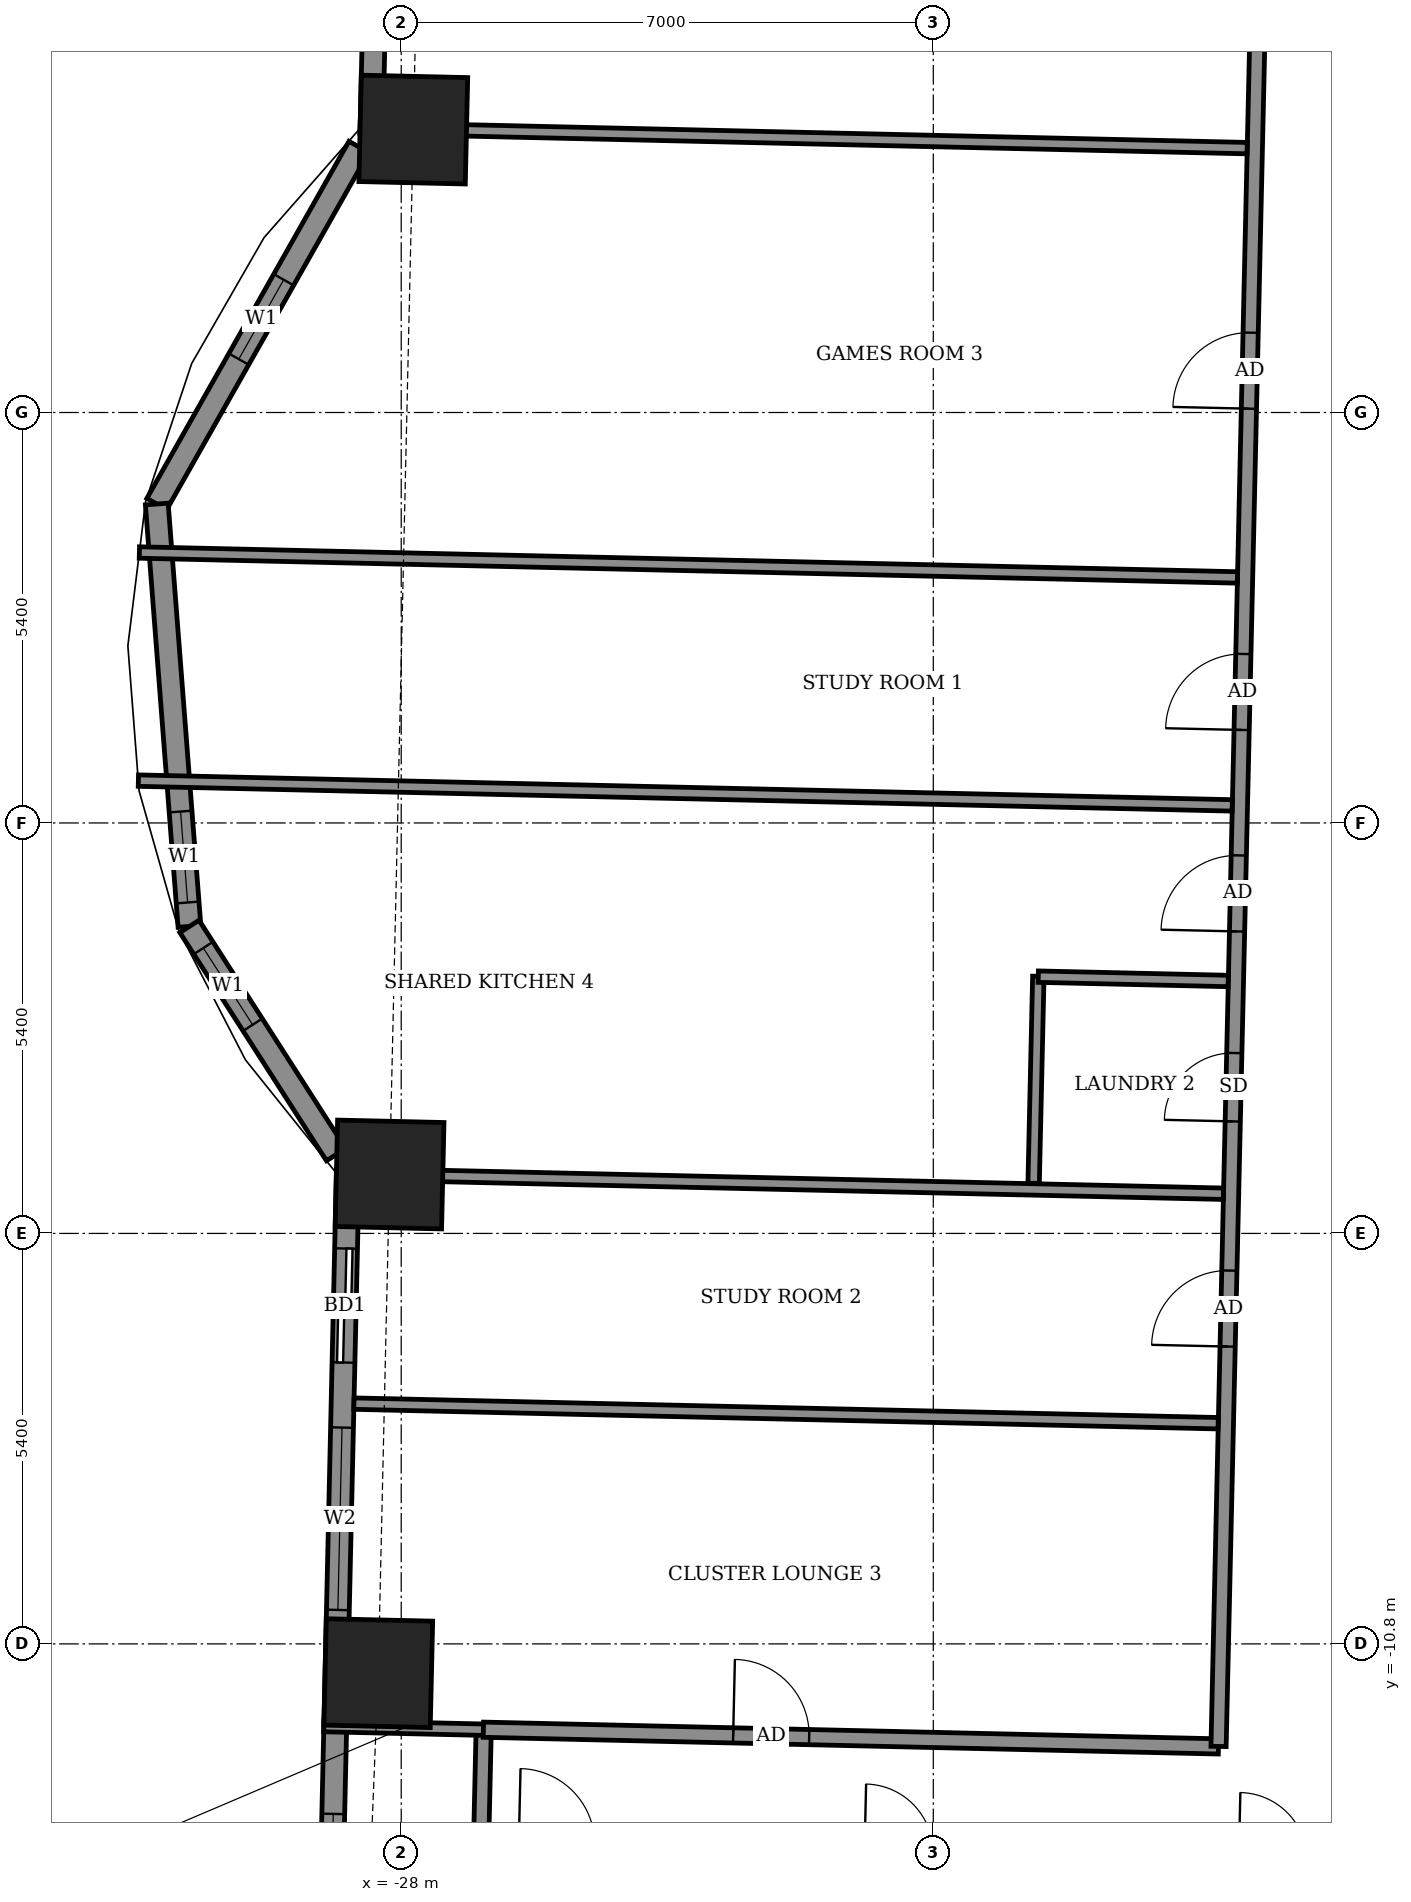
"""IFC4 building model, lengths in metres.
Left out: names, types, materials, properties, quantities, classifications, styles, units other than length and angle.
Written with IfcOpenShell. Run it as: python <this file> out.ifc"""

import sys

from ifc_helpers import new_model, si_unit, direction, frame, frame_2d, origin, origin_2d, place, context, subcontext, project, spatial, rectangle, extrude, element, fill, save


model = new_model("IFC4")
c1 = context("Model", 3, precision=1e-05, world=origin(), true_north=direction((0.0, 1.0)))
c2 = subcontext(c1, "Body", "Model", "MODEL_VIEW")
j1 = project(units=[si_unit("LENGTHUNIT", "METRE"), si_unit("PLANEANGLEUNIT", "RADIAN")], contexts=[c1])
p1 = place(None, origin())
s1 = spatial("IfcSite", under=j1, at=p1, CompositionType="ELEMENT")
p2 = place(p1, origin())
s2 = spatial("IfcBuilding", under=s1, at=p2, CompositionType="ELEMENT")
p3 = place(p2, frame((0.0, 0.0, 109.1)))
s3 = spatial("IfcBuildingStorey", under=s2, at=p3, CompositionType="ELEMENT", Elevation=109.1)
for number, where, z_axis, x_axis in (
    (1, (-28.153, -4.625, -0.55), (0.0, 0.0, 1.0), (-0.023, -1.0, 0.0)),
    (2, (-28.302, -11.185, -0.55), (0.0, 0.0, 1.0), (-0.023, -1.0, 0.0)),
    (3, (-27.841, 9.122, -0.55), (0.0, 0.0, 1.0), (-0.023, -1.0, 0.0)),
):
    element("IfcColumn", number, at=place(p3, frame(where, z_axis=z_axis, x_axis=x_axis)), inside=s3, PredefinedType="COLUMN", context=c2, shape_type="SweptSolid", body=[
        extrude(rectangle(XDim=1.4, YDim=1.4, at=origin_2d()), origin(), (0.0, 0.0, 1.0), 3.6),
    ])
p4 = place(p3, frame((-28.106, 21.707, 0.0), z_axis=(0.0, 0.0, 1.0), x_axis=(-0.022654663697, -0.999743350172, 0.0)))
e4 = element("IfcWall", 4, at=p4, inside=s3, PredefinedType="SOLIDWALL", context=c2, shape_type="SweptSolid", body=[
    extrude(rectangle(XDim=12.63, YDim=0.3, at=frame_2d((6.315, 0.0))), origin(), (0.0, 0.0, 1.0), 3.05),
])
p5 = place(p4, frame((2.625, 0.0, 0.0)))
e5 = element("IfcOpeningElement", 5, at=p5, cuts=e4, PredefinedType="OPENING", context=c2, shape_type="SweptSolid", body=[
    extrude(rectangle(XDim=1.5, YDim=2.4, at=frame_2d((0.75, 1.2))), frame((0.0, 0.16, 0.0), z_axis=(0.0, -1.0, 0.0), x_axis=(1.0, 0.0, 0.0)), (0.0, 0.0, 1.0), 0.32),
])
p6 = place(p4, frame((9.101, 0.0, 0.9)))
e6 = element("IfcOpeningElement", 6, at=p6, cuts=e4, PredefinedType="OPENING", context=c2, shape_type="SweptSolid", body=[
    extrude(rectangle(XDim=2.4, YDim=1.5, at=frame_2d((1.2, 0.75))), frame((0.0, 0.16, 0.0), z_axis=(0.0, -1.0, 0.0), x_axis=(1.0, 0.0, 0.0)), (0.0, 0.0, 1.0), 0.32),
])
p7 = place(p3, frame((-28.557, 8.894, 0.0), z_axis=(0.0, 0.0, 1.0), x_axis=(-0.492589172415, -0.8702619762, 0.0)))
e7 = element("IfcWall", 7, at=p7, inside=s3, PredefinedType="SOLIDWALL", context=c2, shape_type="SweptSolid", body=[
    extrude(rectangle(XDim=5.398, YDim=0.3, at=frame_2d((2.699, 0.0))), origin(), (0.0, 0.0, 1.0), 3.05),
])
p8 = place(p7, frame((2.008, 0.0, 0.9)))
e8 = element("IfcOpeningElement", 8, at=p8, cuts=e7, PredefinedType="OPENING", context=c2, shape_type="SweptSolid", body=[
    extrude(rectangle(XDim=1.2, YDim=1.5, at=frame_2d((0.6, 0.75))), frame((0.0, 0.16, 0.0), z_axis=(0.0, -1.0, 0.0), x_axis=(1.0, 0.0, 0.0)), (0.0, 0.0, 1.0), 0.32),
])
p9 = place(p3, frame((-31.216, 4.196, 0.0), z_axis=(0.0, 0.0, 1.0), x_axis=(0.077178825362, -0.997017266107, 0.0)))
e9 = element("IfcWall", 9, at=p9, inside=s3, PredefinedType="SOLIDWALL", context=c2, shape_type="SweptSolid", body=[
    extrude(rectangle(XDim=5.574, YDim=0.3, at=frame_2d((2.787, 0.0))), origin(), (0.0, 0.0, 1.0), 3.05),
])
p10 = place(p9, frame((4.058, 0.0, 0.9)))
e10 = element("IfcOpeningElement", 10, at=p10, cuts=e9, PredefinedType="OPENING", context=c2, shape_type="SweptSolid", body=[
    extrude(rectangle(XDim=1.2, YDim=1.5, at=frame_2d((0.6, 0.75))), frame((0.0, 0.16, 0.0), z_axis=(0.0, -1.0, 0.0), x_axis=(1.0, 0.0, 0.0)), (0.0, 0.0, 1.0), 0.32),
])
p11 = place(p3, frame((-30.786, -1.361, 0.0), z_axis=(0.0, 0.0, 1.0), x_axis=(0.54058467792, -0.841289608873, 0.0)))
e11 = element("IfcWall", 11, at=p11, inside=s3, PredefinedType="SOLIDWALL", context=c2, shape_type="SweptSolid", body=[
    extrude(rectangle(XDim=3.568, YDim=0.3, at=frame_2d((1.784, 0.0))), origin(), (0.0, 0.0, 1.0), 3.05),
])
p12 = place(p11, frame((0.338, 0.0, 0.9)))
e12 = element("IfcOpeningElement", 12, at=p12, cuts=e11, PredefinedType="OPENING", context=c2, shape_type="SweptSolid", body=[
    extrude(rectangle(XDim=1.2, YDim=1.5, at=frame_2d((0.6, 0.75))), frame((0.0, 0.16, 0.0), z_axis=(0.0, -1.0, 0.0), x_axis=(1.0, 0.0, 0.0)), (0.0, 0.0, 1.0), 0.32),
])
p13 = place(p3, frame((-28.702, -4.557, 0.0), z_axis=(0.0, 0.0, 1.0), x_axis=(-0.022653729471, -0.999743371341, 0.0)))
e13 = element("IfcWall", 13, at=p13, inside=s3, PredefinedType="SOLIDWALL", context=c2, shape_type="SweptSolid", body=[
    extrude(rectangle(XDim=13.03, YDim=0.3, at=frame_2d((6.515, 0.0))), origin(), (0.0, 0.0, 1.0), 3.05),
])
p14 = place(p13, frame((1.042, 0.0, 0.0)))
e14 = element("IfcOpeningElement", 14, at=p14, cuts=e13, PredefinedType="OPENING", context=c2, shape_type="SweptSolid", body=[
    extrude(rectangle(XDim=1.5, YDim=2.4, at=frame_2d((0.75, 1.2))), frame((0.0, 0.16, 0.0), z_axis=(0.0, -1.0, 0.0), x_axis=(1.0, 0.0, 0.0)), (0.0, 0.0, 1.0), 0.32),
])
p15 = place(p13, frame((3.398, 0.0, 0.9)))
e15 = element("IfcOpeningElement", 15, at=p15, cuts=e13, PredefinedType="OPENING", context=c2, shape_type="SweptSolid", body=[
    extrude(rectangle(XDim=2.4, YDim=1.5, at=frame_2d((1.2, 0.75))), frame((0.0, 0.16, 0.0), z_axis=(0.0, -1.0, 0.0), x_axis=(1.0, 0.0, 0.0)), (0.0, 0.0, 1.0), 0.32),
])
p16 = place(p13, frame((8.482, 0.0, 0.9)))
e16 = element("IfcOpeningElement", 16, at=p16, cuts=e13, PredefinedType="OPENING", context=c2, shape_type="SweptSolid", body=[
    extrude(rectangle(XDim=2.4, YDim=1.5, at=frame_2d((1.2, 0.75))), frame((0.0, 0.16, 0.0), z_axis=(0.0, -1.0, 0.0), x_axis=(1.0, 0.0, 0.0)), (0.0, 0.0, 1.0), 0.32),
])
p17 = place(p3, frame((-26.949, -13.429, 0.0), z_axis=(0.0, 0.0, 1.0), x_axis=(0.022617910375, 0.999744182344, 0.0)))
e17 = element("IfcWall", 17, at=p17, inside=s3, PredefinedType="PARTITIONING", context=c2, shape_type="SweptSolid", body=[
    extrude(rectangle(XDim=1.5, YDim=0.2, at=frame_2d((0.75, 0.0))), origin(), (0.0, 0.0, 1.0), 3.05),
])
p18 = place(p3, frame((-29.018, -11.881, 0.0), z_axis=(0.0, 0.0, 1.0), x_axis=(0.999741236023, -0.022747769011, 0.0)))
e18 = element("IfcWall", 18, at=p18, inside=s3, PredefinedType="PARTITIONING", context=c2, shape_type="SweptSolid", body=[
    extrude(rectangle(XDim=2.104, YDim=0.15, at=frame_2d((1.052, 0.0))), origin(), (0.0, 0.0, 1.0), 2.55),
])
p19 = place(p3, frame((-26.919, -11.929, 0.0), z_axis=(0.0, 0.0, 1.0), x_axis=(0.999741418429, -0.022739751035, 0.0)))
e19 = element("IfcWall", 19, at=p19, inside=s3, PredefinedType="PARTITIONING", context=c2, shape_type="SweptSolid", body=[
    extrude(rectangle(XDim=9.673, YDim=0.2, at=frame_2d((4.837, 0.0))), origin(), (0.0, 0.0, 1.0), 3.05),
])
p20 = place(p19, frame((3.287, 0.0, 0.0)))
e20 = element("IfcOpeningElement", 20, at=p20, cuts=e19, PredefinedType="OPENING", context=c2, shape_type="SweptSolid", body=[
    extrude(rectangle(XDim=1.0, YDim=2.1, at=frame_2d((0.5, 1.05))), frame((0.0, 0.11, 0.0), z_axis=(0.0, -1.0, 0.0), x_axis=(1.0, 0.0, 0.0)), (0.0, 0.0, 1.0), 0.22),
])
p21 = place(p3, frame((-17.247, -12.149, 0.0), z_axis=(0.0, 0.0, 1.0), x_axis=(0.022696191528, 0.999742408268, 0.0)))
e21 = element("IfcWall", 21, at=p21, inside=s3, PredefinedType="PARTITIONING", context=c2, shape_type="SweptSolid", body=[
    extrude(rectangle(XDim=25.074, YDim=0.2, at=frame_2d((12.537, 0.0))), origin(), (0.0, 0.0, 1.0), 3.05),
])
p22 = place(p21, frame((17.604, 0.0, 0.0)))
e22 = element("IfcOpeningElement", 22, at=p22, cuts=e21, PredefinedType="OPENING", context=c2, shape_type="SweptSolid", body=[
    extrude(rectangle(XDim=1.0, YDim=2.1, at=frame_2d((0.5, 1.05))), frame((0.0, 0.11, 0.0), z_axis=(0.0, -1.0, 0.0), x_axis=(1.0, 0.0, 0.0)), (0.0, 0.0, 1.0), 0.22),
])
p23 = place(p21, frame((13.376, 0.0, 0.0)))
e23 = element("IfcOpeningElement", 23, at=p23, cuts=e21, PredefinedType="OPENING", context=c2, shape_type="SweptSolid", body=[
    extrude(rectangle(XDim=1.0, YDim=2.1, at=frame_2d((0.5, 1.05))), frame((0.0, 0.11, 0.0), z_axis=(0.0, -1.0, 0.0), x_axis=(1.0, 0.0, 0.0)), (0.0, 0.0, 1.0), 0.22),
])
p24 = place(p21, frame((10.725, 0.0, 0.0)))
e24 = element("IfcOpeningElement", 24, at=p24, cuts=e21, PredefinedType="OPENING", context=c2, shape_type="SweptSolid", body=[
    extrude(rectangle(XDim=1.0, YDim=2.1, at=frame_2d((0.5, 1.05))), frame((0.0, 0.11, 0.0), z_axis=(0.0, -1.0, 0.0), x_axis=(1.0, 0.0, 0.0)), (0.0, 0.0, 1.0), 0.22),
])
p25 = place(p21, frame((8.225, 0.0, 0.0)))
e25 = element("IfcOpeningElement", 25, at=p25, cuts=e21, PredefinedType="OPENING", context=c2, shape_type="SweptSolid", body=[
    extrude(rectangle(XDim=0.9, YDim=2.1, at=frame_2d((0.45, 1.05))), frame((0.0, 0.11, 0.0), z_axis=(0.0, -1.0, 0.0), x_axis=(1.0, 0.0, 0.0)), (0.0, 0.0, 1.0), 0.22),
])
p26 = place(p21, frame((5.262, 0.0, 0.0)))
e26 = element("IfcOpeningElement", 26, at=p26, cuts=e21, PredefinedType="OPENING", context=c2, shape_type="SweptSolid", body=[
    extrude(rectangle(XDim=1.0, YDim=2.1, at=frame_2d((0.5, 1.05))), frame((0.0, 0.11, 0.0), z_axis=(0.0, -1.0, 0.0), x_axis=(1.0, 0.0, 0.0)), (0.0, 0.0, 1.0), 0.22),
])
p27 = place(p3, frame((-28.622, -7.639, 0.0), z_axis=(0.0, 0.0, 1.0), x_axis=(0.999742544331, -0.022690197315, 0.0)))
e27 = element("IfcWall", 27, at=p27, inside=s3, PredefinedType="PARTITIONING", context=c2, shape_type="SweptSolid", body=[
    extrude(rectangle(XDim=11.373, YDim=0.15, at=frame_2d((5.687, 0.0))), origin(), (0.0, 0.0, 1.0), 2.55),
])
p28 = place(p3, frame((-28.553, -4.62, 0.0), z_axis=(0.0, 0.0, 1.0), x_axis=(0.999743020026, -0.022669228257, 0.0)))
e28 = element("IfcWall", 28, at=p28, inside=s3, PredefinedType="PARTITIONING", context=c2, shape_type="SweptSolid", body=[
    extrude(rectangle(XDim=11.373, YDim=0.15, at=frame_2d((5.687, 0.0))), origin(), (0.0, 0.0, 1.0), 3.05),
])
p29 = place(p3, frame((-19.68, -4.741, 0.0), z_axis=(0.0, 0.0, 1.0), x_axis=(0.022760079124, 0.999740955847, 0.0)))
e29 = element("IfcWall", 29, at=p29, inside=s3, PredefinedType="PARTITIONING", context=c2, shape_type="SweptSolid", body=[
    extrude(rectangle(XDim=2.725, YDim=0.15, at=frame_2d((1.362, 0.0))), origin(), (0.0, 0.0, 1.0), 3.05),
])
p30 = place(p3, frame((-19.619, -2.022, 0.0), z_axis=(0.0, 0.0, 1.0), x_axis=(0.999738750294, -0.02285675306, 0.0)))
e30 = element("IfcWall", 30, at=p30, inside=s3, PredefinedType="PARTITIONING", context=c2, shape_type="SweptSolid", body=[
    extrude(rectangle(XDim=2.5, YDim=0.15, at=frame_2d((1.25, 0.0))), origin(), (0.0, 0.0, 1.0), 3.05),
])
p31 = place(p3, frame((-31.458, 0.557, 0.0), z_axis=(0.0, 0.0, 1.0), x_axis=(0.999743636126, -0.022642041092, 0.0)))
e31 = element("IfcWall", 31, at=p31, inside=s3, PredefinedType="PARTITIONING", context=c2, shape_type="SweptSolid", body=[
    extrude(rectangle(XDim=14.395, YDim=0.15, at=frame_2d((7.197, 0.0))), origin(), (0.0, 0.0, 1.0), 2.05),
])
p32 = place(p3, frame((-31.445, 3.558, 0.0), z_axis=(0.0, 0.0, 1.0), x_axis=(0.999742140748, -0.022707972439, 0.0)))
e32 = element("IfcWall", 32, at=p32, inside=s3, PredefinedType="PARTITIONING", context=c2, shape_type="SweptSolid", body=[
    extrude(rectangle(XDim=14.45, YDim=0.15, at=frame_2d((7.225, 0.0))), origin(), (0.0, 0.0, 1.0), 2.05),
])
p33 = place(p3, frame((-28.541, 9.143, 0.0), z_axis=(0.0, 0.0, 1.0), x_axis=(0.999742008279, -0.022713803786, 0.0)))
e33 = element("IfcWall", 33, at=p33, inside=s3, PredefinedType="PARTITIONING", context=c2, shape_type="SweptSolid", body=[
    extrude(rectangle(XDim=11.673, YDim=0.15, at=frame_2d((5.836, 0.0))), origin(), (0.0, 0.0, 1.0), 3.05),
])
p34 = place(p8, origin())
e34 = element("IfcWindow", 34, at=p34, inside=s3, PartitioningType="SINGLE_PANEL", PredefinedType="WINDOW", context=c2, shape_type="SweptSolid", body=[
    extrude(rectangle(XDim=1.2, YDim=1.5, at=frame_2d((0.6, 0.75))), frame((0.0, 0.03, 0.0), z_axis=(0.0, -1.0, 0.0), x_axis=(1.0, 0.0, 0.0)), (0.0, 0.0, 1.0), 0.06),
])
fill(e8, e34)
p35 = place(p10, origin())
e35 = element("IfcWindow", 35, at=p35, inside=s3, PartitioningType="SINGLE_PANEL", PredefinedType="WINDOW", context=c2, shape_type="SweptSolid", body=[
    extrude(rectangle(XDim=1.2, YDim=1.5, at=frame_2d((0.6, 0.75))), frame((0.0, 0.03, 0.0), z_axis=(0.0, -1.0, 0.0), x_axis=(1.0, 0.0, 0.0)), (0.0, 0.0, 1.0), 0.06),
])
fill(e10, e35)
p36 = place(p12, origin())
e36 = element("IfcWindow", 36, at=p36, inside=s3, PartitioningType="SINGLE_PANEL", PredefinedType="WINDOW", context=c2, shape_type="SweptSolid", body=[
    extrude(rectangle(XDim=1.2, YDim=1.5, at=frame_2d((0.6, 0.75))), frame((0.0, 0.03, 0.0), z_axis=(0.0, -1.0, 0.0), x_axis=(1.0, 0.0, 0.0)), (0.0, 0.0, 1.0), 0.06),
])
fill(e12, e36)
p37 = place(p14, origin())
e37 = element("IfcDoor", 37, at=p37, inside=s3, OperationType="SLIDING_TO_LEFT", PredefinedType="DOOR", context=c2, shape_type="SweptSolid", body=[
    extrude(rectangle(XDim=1.5, YDim=2.4, at=frame_2d((0.75, 1.2))), frame((0.0, 0.025, 0.0), z_axis=(0.0, -1.0, 0.0), x_axis=(1.0, 0.0, 0.0)), (0.0, 0.0, 1.0), 0.05),
])
fill(e14, e37)
p38 = place(p15, origin())
e38 = element("IfcWindow", 38, at=p38, inside=s3, PartitioningType="DOUBLE_PANEL_VERTICAL", PredefinedType="WINDOW", context=c2, shape_type="SweptSolid", body=[
    extrude(rectangle(XDim=2.4, YDim=1.5, at=frame_2d((1.2, 0.75))), frame((0.0, 0.03, 0.0), z_axis=(0.0, -1.0, 0.0), x_axis=(1.0, 0.0, 0.0)), (0.0, 0.0, 1.0), 0.06),
])
fill(e15, e38)
p39 = place(p16, origin())
e39 = element("IfcWindow", 39, at=p39, inside=s3, PartitioningType="DOUBLE_PANEL_VERTICAL", PredefinedType="WINDOW", context=c2, shape_type="SweptSolid", body=[
    extrude(rectangle(XDim=2.4, YDim=1.5, at=frame_2d((1.2, 0.75))), frame((0.0, 0.03, 0.0), z_axis=(0.0, -1.0, 0.0), x_axis=(1.0, 0.0, 0.0)), (0.0, 0.0, 1.0), 0.06),
])
fill(e16, e39)
p40 = place(p22, origin())
e40 = element("IfcDoor", 40, at=p40, inside=s3, OperationType="SINGLE_SWING_RIGHT", PredefinedType="DOOR", context=c2, shape_type="SweptSolid", body=[
    extrude(rectangle(XDim=1.0, YDim=2.1, at=frame_2d((0.5, 1.05))), frame((0.0, 0.025, 0.0), z_axis=(0.0, -1.0, 0.0), x_axis=(1.0, 0.0, 0.0)), (0.0, 0.0, 1.0), 0.05),
])
fill(e22, e40)
p41 = place(p23, origin())
e41 = element("IfcDoor", 41, at=p41, inside=s3, OperationType="SINGLE_SWING_LEFT", PredefinedType="DOOR", context=c2, shape_type="SweptSolid", body=[
    extrude(rectangle(XDim=1.0, YDim=2.1, at=frame_2d((0.5, 1.05))), frame((0.0, 0.025, 0.0), z_axis=(0.0, -1.0, 0.0), x_axis=(1.0, 0.0, 0.0)), (0.0, 0.0, 1.0), 0.05),
])
fill(e23, e41)
p42 = place(p24, origin())
e42 = element("IfcDoor", 42, at=p42, inside=s3, OperationType="SINGLE_SWING_RIGHT", PredefinedType="DOOR", context=c2, shape_type="SweptSolid", body=[
    extrude(rectangle(XDim=1.0, YDim=2.1, at=frame_2d((0.5, 1.05))), frame((0.0, 0.025, 0.0), z_axis=(0.0, -1.0, 0.0), x_axis=(1.0, 0.0, 0.0)), (0.0, 0.0, 1.0), 0.05),
])
fill(e24, e42)
p43 = place(p25, origin())
e43 = element("IfcDoor", 43, at=p43, inside=s3, OperationType="SINGLE_SWING_RIGHT", PredefinedType="DOOR", context=c2, shape_type="SweptSolid", body=[
    extrude(rectangle(XDim=0.9, YDim=2.1, at=frame_2d((0.45, 1.05))), frame((0.0, 0.025, 0.0), z_axis=(0.0, -1.0, 0.0), x_axis=(1.0, 0.0, 0.0)), (0.0, 0.0, 1.0), 0.05),
])
fill(e25, e43)
p44 = place(p26, origin())
e44 = element("IfcDoor", 44, at=p44, inside=s3, OperationType="SINGLE_SWING_LEFT", PredefinedType="DOOR", context=c2, shape_type="SweptSolid", body=[
    extrude(rectangle(XDim=1.0, YDim=2.1, at=frame_2d((0.5, 1.05))), frame((0.0, 0.025, 0.0), z_axis=(0.0, -1.0, 0.0), x_axis=(1.0, 0.0, 0.0)), (0.0, 0.0, 1.0), 0.05),
])
fill(e26, e44)
p45 = place(p20, origin())
e45 = element("IfcDoor", 45, at=p45, inside=s3, OperationType="SINGLE_SWING_RIGHT", PredefinedType="DOOR", context=c2, shape_type="SweptSolid", body=[
    extrude(rectangle(XDim=1.0, YDim=2.1, at=frame_2d((0.5, 1.05))), frame((0.0, 0.025, 0.0), z_axis=(0.0, -1.0, 0.0), x_axis=(1.0, 0.0, 0.0)), (0.0, 0.0, 1.0), 0.05),
])
fill(e20, e45)
save(model, sys.argv[1])
